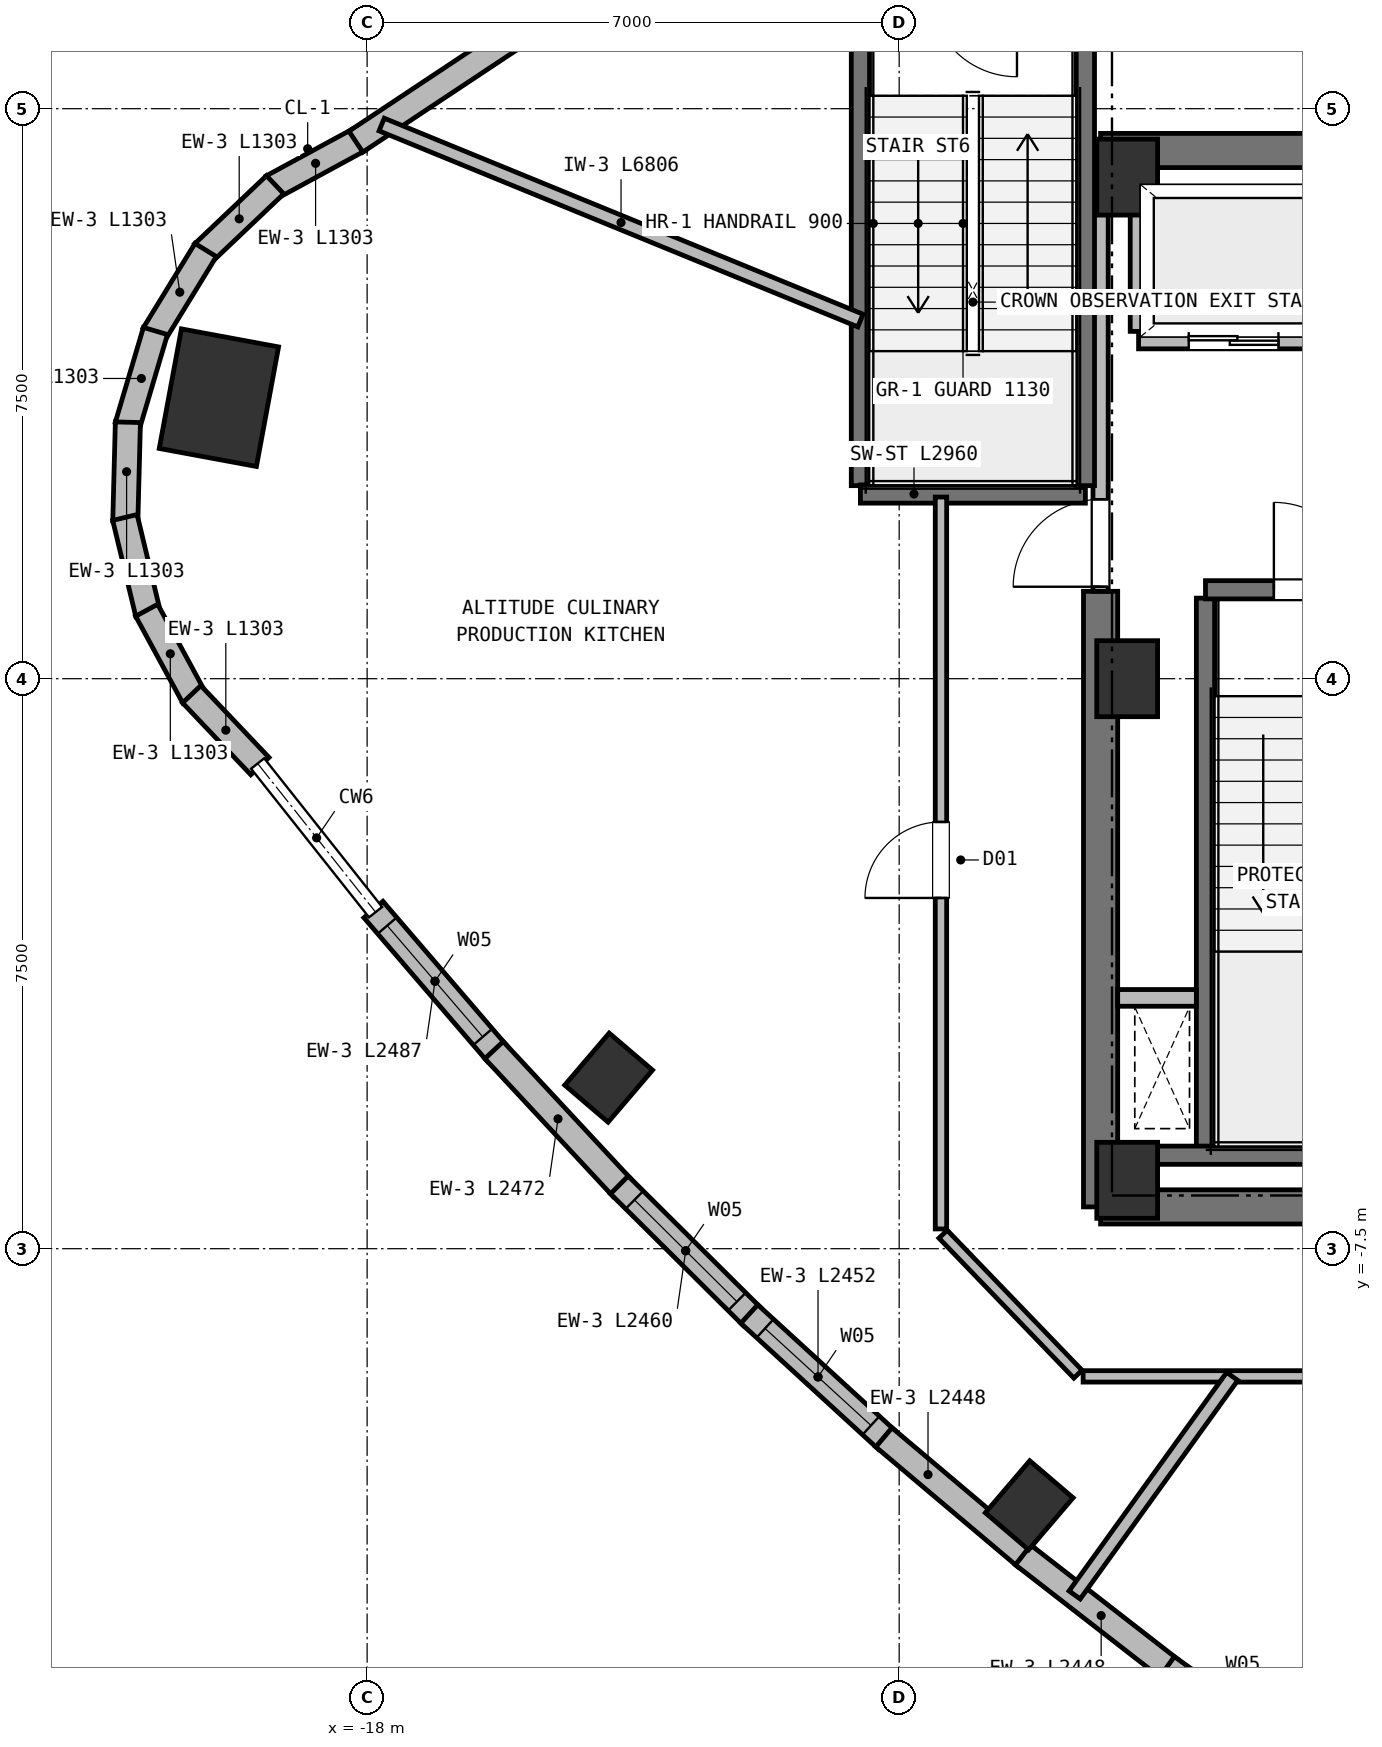
"""IFC4 building model, lengths in metres.
Left out: names, types, materials, properties, quantities, classifications, styles, units other than length and angle.
Written with IfcOpenShell. Run it as: python <this file> out.ifc"""

import sys

from ifc_helpers import new_model, si_unit, direction, frame, frame_2d, origin, origin_2d, place, context, subcontext, project, spatial, rectangle, extrude, element, fill, save


model = new_model("IFC4")
c1 = context("Model", 3, precision=1e-05, world=origin(), true_north=direction((0.0, 1.0)))
c2 = subcontext(c1, "Body", "Model", "MODEL_VIEW")
j1 = project(units=[si_unit("LENGTHUNIT", "METRE"), si_unit("PLANEANGLEUNIT", "RADIAN")], contexts=[c1])
p1 = place(None, origin())
s1 = spatial("IfcSite", under=j1, at=p1, CompositionType="ELEMENT")
p2 = place(p1, origin())
s2 = spatial("IfcBuilding", under=s1, at=p2, CompositionType="ELEMENT")
p3 = place(p2, frame((0.0, 0.0, 272.8)))
s3 = spatial("IfcBuildingStorey", under=s2, at=p3, CompositionType="ELEMENT", Elevation=272.8)
for number, where, z_axis, x_axis in (
    (1, (-8.0, -6.6, 0.0), (0.0, 0.0, 1.0), (1.0, 0.0, 0.0)),
    (2, (-8.0, 6.6, 0.0), (0.0, 0.0, 1.0), (1.0, 0.0, 0.0)),
    (3, (-8.0, 0.0, 0.0), (0.0, 0.0, 1.0), (1.0, 0.0, 0.0)),
):
    element("IfcColumn", number, at=place(p3, frame(where, z_axis=z_axis, x_axis=x_axis)), inside=s3, PredefinedType="COLUMN", context=c2, shape_type="SweptSolid", body=[
        extrude(rectangle(XDim=0.8, YDim=1.0, at=origin_2d()), origin(), (0.0, 0.0, 1.0), 4.4),
    ])
p4 = place(p3, frame((-8.35, 6.95, 0.0), z_axis=(0.0, 0.0, 1.0), x_axis=(1.0, 0.0, 0.0)))
e4 = element("IfcWall", 4, at=p4, inside=s3, PredefinedType="SHEAR", context=c2, shape_type="SweptSolid", body=[
    extrude(rectangle(XDim=16.7, YDim=0.45, at=frame_2d((8.35, 0.0))), origin(), (0.0, 0.0, 1.0), 4.15),
])
p5 = place(p3, frame((-8.35, -6.95, 0.0), z_axis=(0.0, 0.0, 1.0), x_axis=(1.0, 0.0, 0.0)))
e5 = element("IfcWall", 5, at=p5, inside=s3, PredefinedType="SHEAR", context=c2, shape_type="SweptSolid", body=[
    extrude(rectangle(XDim=3.95, YDim=0.45, at=frame_2d((1.975, 0.0))), origin(), (0.0, 0.0, 1.0), 4.15),
])
p6 = place(p3, frame((-8.35, -6.95, 0.0), z_axis=(0.0, 0.0, 1.0), x_axis=(0.0, 1.0, 0.0)))
e6 = element("IfcWall", 6, at=p6, inside=s3, PredefinedType="SHEAR", context=c2, shape_type="SweptSolid", body=[
    extrude(rectangle(XDim=8.1, YDim=0.45, at=frame_2d((4.05, 0.0))), origin(), (0.0, 0.0, 1.0), 4.15),
])
p7 = place(p3, frame((-19.95, 3.698, 0.0), z_axis=(0.0, 0.0, 1.0), x_axis=(-0.983254907564, 0.182235525492, 0.0)))
e7 = element("IfcColumn", 7, at=p7, inside=s3, PredefinedType="COLUMN", context=c2, shape_type="SweptSolid", body=[
    extrude(rectangle(XDim=1.3, YDim=1.6, at=origin_2d()), origin(), (0.0, 0.0, 1.0), 4.4),
])
for number, where, z_axis, x_axis in (
    (8, (-14.823, -5.249, 0.0), (0.0, 0.0, 1.0), (-0.76, 0.649, 0.0)),
    (9, (-9.289, -10.876, 0.0), (0.0, 0.0, 1.0), (-0.76, 0.649, 0.0)),
):
    element("IfcColumn", number, at=place(p3, frame(where, z_axis=z_axis, x_axis=x_axis)), inside=s3, PredefinedType="COLUMN", context=c2, shape_type="SweptSolid", body=[
        extrude(rectangle(XDim=0.75, YDim=0.9, at=origin_2d()), origin(), (0.0, 0.0, 1.0), 4.4),
    ])
p8 = place(p3, frame((-19.25, 6.47, 0.0), z_axis=(0.0, 0.0, 1.0), x_axis=(0.878774855812, 0.477236579478, 0.0)))
e10 = element("IfcWall", 10, at=p8, inside=s3, PredefinedType="SOLIDWALL", context=c2, shape_type="SweptSolid", body=[
    extrude(rectangle(XDim=1.303, YDim=0.33, at=frame_2d((0.651, 0.0))), origin(), (0.0, 0.0, 1.0), 4.15),
])
p9 = place(p3, frame((-20.156, 5.602, 0.0), z_axis=(0.0, 0.0, 1.0), x_axis=(0.725415712612, 0.688311008118, 0.0)))
e11 = element("IfcWall", 11, at=p9, inside=s3, PredefinedType="SOLIDWALL", context=c2, shape_type="SweptSolid", body=[
    extrude(rectangle(XDim=1.303, YDim=0.33, at=frame_2d((0.651, 0.0))), origin(), (0.0, 0.0, 1.0), 4.15),
])
p10 = place(p3, frame((-20.805, 4.53, 0.0), z_axis=(0.0, 0.0, 1.0), x_axis=(0.522601602676, 0.852577014047, 0.0)))
e12 = element("IfcWall", 12, at=p10, inside=s3, PredefinedType="SOLIDWALL", context=c2, shape_type="SweptSolid", body=[
    extrude(rectangle(XDim=1.303, YDim=0.33, at=frame_2d((0.651, 0.0))), origin(), (0.0, 0.0, 1.0), 4.15),
])
p11 = place(p3, frame((-21.155, 3.325, 0.0), z_axis=(0.0, 0.0, 1.0), x_axis=(0.284011785169, 0.958820789243, 0.0)))
e13 = element("IfcWall", 13, at=p11, inside=s3, PredefinedType="SOLIDWALL", context=c2, shape_type="SweptSolid", body=[
    extrude(rectangle(XDim=1.303, YDim=0.33, at=frame_2d((0.652, 0.0))), origin(), (0.0, 0.0, 1.0), 4.15),
])
for number, where, z_axis, x_axis in (
    (14, (-21.182, 2.072, 0.0), (0.0, 0.0, 1.0), (0.026, 1.0, 0.0)),
    (15, (-20.883, 0.854, 0.0), (0.0, 0.0, 1.0), (-0.233, 0.972, 0.0)),
    (16, (-20.279, -0.245, 0.0), (0.0, 0.0, 1.0), (-0.477, 0.879, 0.0)),
):
    element("IfcWall", number, at=place(p3, frame(where, z_axis=z_axis, x_axis=x_axis)), inside=s3, PredefinedType="SOLIDWALL", context=c2, shape_type="SweptSolid", body=[
        extrude(rectangle(XDim=1.303, YDim=0.33, at=frame_2d((0.651, 0.0))), origin(), (0.0, 0.0, 1.0), 4.15),
    ])
p12 = place(p3, frame((-19.411, -1.15, 0.0), z_axis=(0.0, 0.0, 1.0), x_axis=(-0.688316050819, 0.725410927809, 0.0)))
e17 = element("IfcWall", 17, at=p12, inside=s3, PredefinedType="SOLIDWALL", context=c2, shape_type="SweptSolid", body=[
    extrude(rectangle(XDim=1.303, YDim=0.33, at=frame_2d((0.652, 0.0))), origin(), (0.0, 0.0, 1.0), 4.15),
])
p13 = place(p3, frame((-16.297, -4.924, 0.0), z_axis=(0.0, 0.0, 1.0), x_axis=(-0.651591190477, 0.75857031348, 0.0)))
e18 = element("IfcWall", 18, at=p13, inside=s3, PredefinedType="SOLIDWALL", context=c2, shape_type="SweptSolid", body=[
    extrude(rectangle(XDim=2.488, YDim=0.33, at=frame_2d((1.244, 0.0))), origin(), (0.0, 0.0, 1.0), 4.15),
])
p14 = place(p13, frame((0.279, 0.0, 0.72)))
e19 = element("IfcOpeningElement", 19, at=p14, cuts=e18, PredefinedType="OPENING", context=c2, shape_type="SweptSolid", body=[
    extrude(rectangle(XDim=1.93, YDim=2.15, at=frame_2d((0.965, 1.075))), frame((0.0, 0.175, 0.0), z_axis=(0.0, -1.0, 0.0), x_axis=(1.0, 0.0, 0.0)), (0.0, 0.0, 1.0), 0.35),
])
p15 = place(p3, frame((-14.647, -6.697, 0.0), z_axis=(0.0, 0.0, 1.0), x_axis=(-0.681011582837, 0.732272643242, 0.0)))
e20 = element("IfcWall", 20, at=p15, inside=s3, PredefinedType="SOLIDWALL", context=c2, shape_type="SweptSolid", body=[
    extrude(rectangle(XDim=2.472, YDim=0.33, at=frame_2d((1.236, 0.0))), origin(), (0.0, 0.0, 1.0), 4.15),
])
p16 = place(p3, frame((-12.936, -8.394, 0.0), z_axis=(0.0, 0.0, 1.0), x_axis=(-0.709682736457, 0.704521407464, 0.0)))
e21 = element("IfcWall", 21, at=p16, inside=s3, PredefinedType="SOLIDWALL", context=c2, shape_type="SweptSolid", body=[
    extrude(rectangle(XDim=2.46, YDim=0.33, at=frame_2d((1.23, 0.0))), origin(), (0.0, 0.0, 1.0), 4.15),
])
p17 = place(p16, frame((0.28, 0.0, 0.72)))
e22 = element("IfcOpeningElement", 22, at=p17, cuts=e21, PredefinedType="OPENING", context=c2, shape_type="SweptSolid", body=[
    extrude(rectangle(XDim=1.9, YDim=2.15, at=frame_2d((0.95, 1.075))), frame((0.0, 0.175, 0.0), z_axis=(0.0, -1.0, 0.0), x_axis=(1.0, 0.0, 0.0)), (0.0, 0.0, 1.0), 0.35),
])
p18 = place(p3, frame((-11.164, -10.015, 0.0), z_axis=(0.0, 0.0, 1.0), x_axis=(-0.73744340021, 0.675408936487, 0.0)))
e23 = element("IfcWall", 23, at=p18, inside=s3, PredefinedType="SOLIDWALL", context=c2, shape_type="SweptSolid", body=[
    extrude(rectangle(XDim=2.452, YDim=0.33, at=frame_2d((1.226, 0.0))), origin(), (0.0, 0.0, 1.0), 4.15),
])
p19 = place(p18, frame((0.281, 0.0, 0.72)))
e24 = element("IfcOpeningElement", 24, at=p19, cuts=e23, PredefinedType="OPENING", context=c2, shape_type="SweptSolid", body=[
    extrude(rectangle(XDim=1.89, YDim=2.15, at=frame_2d((0.945, 1.075))), frame((0.0, 0.175, 0.0), z_axis=(0.0, -1.0, 0.0), x_axis=(1.0, 0.0, 0.0)), (0.0, 0.0, 1.0), 0.35),
])
p20 = place(p3, frame((-9.33, -11.561, 0.0), z_axis=(0.0, 0.0, 1.0), x_axis=(-0.764225429478, 0.644949217334, 0.0)))
e25 = element("IfcWall", 25, at=p20, inside=s3, PredefinedType="SOLIDWALL", context=c2, shape_type="SweptSolid", body=[
    extrude(rectangle(XDim=2.448, YDim=0.33, at=frame_2d((1.224, 0.0))), origin(), (0.0, 0.0, 1.0), 4.15),
])
p21 = place(p3, frame((-7.435, -13.031, 0.0), z_axis=(0.0, 0.0, 1.0), x_axis=(-0.789786954421, 0.613381257152, 0.0)))
e26 = element("IfcWall", 26, at=p21, inside=s3, PredefinedType="SOLIDWALL", context=c2, shape_type="SweptSolid", body=[
    extrude(rectangle(XDim=2.448, YDim=0.33, at=frame_2d((1.224, 0.0))), origin(), (0.0, 0.0, 1.0), 4.15),
])
p22 = place(p3, frame((-5.48, -14.427, 0.0), z_axis=(0.0, 0.0, 1.0), x_axis=(-0.813854547638, 0.581068649378, 0.0)))
e27 = element("IfcWall", 27, at=p22, inside=s3, PredefinedType="SOLIDWALL", context=c2, shape_type="SweptSolid", body=[
    extrude(rectangle(XDim=2.452, YDim=0.33, at=frame_2d((1.226, 0.0))), origin(), (0.0, 0.0, 1.0), 4.15),
])
p23 = place(p22, frame((0.281, 0.0, 0.72)))
e28 = element("IfcOpeningElement", 28, at=p23, cuts=e27, PredefinedType="OPENING", context=c2, shape_type="SweptSolid", body=[
    extrude(rectangle(XDim=1.89, YDim=2.15, at=frame_2d((0.945, 1.075))), frame((0.0, 0.175, 0.0), z_axis=(0.0, -1.0, 0.0), x_axis=(1.0, 0.0, 0.0)), (0.0, 0.0, 1.0), 0.35),
])
p24 = place(p3, frame((-18.148, 7.066, 0.0), z_axis=(0.0, 0.0, 1.0), x_axis=(0.833157490591, 0.55303579981, 0.0)))
e29 = element("IfcWall", 29, at=p24, inside=s3, PredefinedType="SOLIDWALL", context=c2, shape_type="SweptSolid", body=[
    extrude(rectangle(XDim=2.507, YDim=0.33, at=frame_2d((1.253, 0.0))), origin(), (0.0, 0.0, 1.0), 4.15),
])
p25 = place(p3, frame((-6.97, -6.16, 0.0), z_axis=(0.0, 0.0, 1.0), x_axis=(0.0, 1.0, 0.0)))
e30 = element("IfcWall", 30, at=p25, inside=s3, PredefinedType="SHEAR", context=c2, shape_type="SweptSolid", body=[
    extrude(rectangle(XDim=7.22, YDim=0.24, at=frame_2d((3.61, 0.0))), origin(), (0.0, 0.0, 1.0), 4.15),
])
p26 = place(p3, frame((-7.6, -6.27, 0.0), z_axis=(0.0, 0.0, 1.0), x_axis=(1.0, 0.0, 0.0)))
e31 = element("IfcWall", 31, at=p26, inside=s3, PredefinedType="SHEAR", context=c2, shape_type="SweptSolid", body=[
    extrude(rectangle(XDim=3.59, YDim=0.24, at=frame_2d((1.795, 0.0))), origin(), (0.0, 0.0, 1.0), 4.15),
])
p27 = place(p3, frame((-6.97, 1.17, 0.0), z_axis=(0.0, 0.0, 1.0), x_axis=(1.0, 0.0, 0.0)))
e32 = element("IfcWall", 32, at=p27, inside=s3, PredefinedType="SHEAR", context=c2, shape_type="SweptSolid", body=[
    extrude(rectangle(XDim=2.96, YDim=0.24, at=frame_2d((1.48, 0.0))), origin(), (0.0, 0.0, 1.0), 4.15),
])
p28 = place(p27, frame((0.9, 0.0, 0.0)))
e33 = element("IfcOpeningElement", 33, at=p28, cuts=e32, PredefinedType="OPENING", context=c2, shape_type="SweptSolid", body=[
    extrude(rectangle(XDim=1.15, YDim=2.15, at=frame_2d((0.575, 1.075))), frame((0.0, 0.13, 0.0), z_axis=(0.0, -1.0, 0.0), x_axis=(1.0, 0.0, 0.0)), (0.0, 0.0, 1.0), 0.26),
])
p29 = place(p3, frame((-8.125, -4.2, 0.0), z_axis=(0.0, 0.0, 1.0), x_axis=(1.0, 0.0, 0.0)))
e34 = element("IfcWall", 34, at=p29, inside=s3, PredefinedType="PARTITIONING", context=c2, shape_type="SweptSolid", body=[
    extrude(rectangle(XDim=1.035, YDim=0.22, at=frame_2d((0.518, 0.0))), origin(), (0.0, 0.0, 1.0), 4.15),
])
p30 = place(p3, frame((-7.85, 4.45, 0.0), z_axis=(0.0, 0.0, 1.0), x_axis=(1.0, 0.0, 0.0)))
e35 = element("IfcWall", 35, at=p30, inside=s3, PredefinedType="PARTITIONING", context=c2, shape_type="SweptSolid", body=[
    extrude(rectangle(XDim=2.5, YDim=0.22, at=frame_2d((1.25, 0.0))), origin(), (0.0, 0.0, 1.0), 4.15),
])
p31 = place(p30, frame((0.66, 0.0, 0.0)))
e36 = element("IfcOpeningElement", 36, at=p31, cuts=e35, PredefinedType="OPENING", context=c2, shape_type="SweptSolid", body=[
    extrude(rectangle(XDim=1.18, YDim=2.15, at=frame_2d((0.59, 1.075))), frame((0.0, 0.12, 0.0), z_axis=(0.0, -1.0, 0.0), x_axis=(1.0, 0.0, 0.0)), (0.0, 0.0, 1.0), 0.24),
])
p32 = place(p3, frame((-7.85, 4.57, 0.0), z_axis=(0.0, 0.0, 1.0), x_axis=(0.0, 1.0, 0.0)))
e37 = element("IfcWall", 37, at=p32, inside=s3, PredefinedType="PARTITIONING", context=c2, shape_type="SweptSolid", body=[
    extrude(rectangle(XDim=2.155, YDim=0.22, at=frame_2d((1.078, 0.0))), origin(), (0.0, 0.0, 1.0), 3.83),
])
p33 = place(p3, frame((-8.35, 1.15, 0.0), z_axis=(0.0, 0.0, 1.0), x_axis=(0.0, 1.0, 0.0)))
e38 = element("IfcWall", 38, at=p33, inside=s3, PredefinedType="PARTITIONING", context=c2, shape_type="SweptSolid", body=[
    extrude(rectangle(XDim=5.4, YDim=0.2, at=frame_2d((2.7, 0.0))), origin(), (0.0, 0.0, 1.0), 4.15),
])
p34 = place(p33, frame((0.06, 0.0, 0.0)))
e39 = element("IfcOpeningElement", 39, at=p34, cuts=e38, PredefinedType="OPENING", context=c2, shape_type="SweptSolid", body=[
    extrude(rectangle(XDim=1.15, YDim=2.15, at=frame_2d((0.575, 1.075))), frame((0.0, 0.11, 0.0), z_axis=(0.0, -1.0, 0.0), x_axis=(1.0, 0.0, 0.0)), (0.0, 0.0, 1.0), 0.22),
])
p35 = place(p3, frame((-11.51, 2.54, 0.0), z_axis=(0.0, 0.0, 1.0), x_axis=(0.0, 1.0, 0.0)))
e40 = element("IfcWall", 40, at=p35, inside=s3, PredefinedType="SHEAR", context=c2, shape_type="SweptSolid", body=[
    extrude(rectangle(XDim=6.42, YDim=0.24, at=frame_2d((3.21, 0.0))), origin(), (0.0, 0.0, 1.0), 4.15),
])
p36 = place(p3, frame((-11.51, 2.43, 0.0), z_axis=(0.0, 0.0, 1.0), x_axis=(1.0, 0.0, 0.0)))
e41 = element("IfcWall", 41, at=p36, inside=s3, PredefinedType="SHEAR", context=c2, shape_type="SweptSolid", body=[
    extrude(rectangle(XDim=2.96, YDim=0.24, at=frame_2d((1.48, 0.0))), origin(), (0.0, 0.0, 1.0), 4.15),
])
p37 = place(p3, frame((-8.55, 2.54, 0.0), z_axis=(0.0, 0.0, 1.0), x_axis=(0.0, 1.0, 0.0)))
e42 = element("IfcWall", 42, at=p37, inside=s3, PredefinedType="SHEAR", context=c2, shape_type="SweptSolid", body=[
    extrude(rectangle(XDim=6.42, YDim=0.24, at=frame_2d((3.21, 0.0))), origin(), (0.0, 0.0, 1.0), 4.15),
])
p38 = place(p3, frame((8.58, -9.18, 0.0), z_axis=(0.0, 0.0, 1.0), x_axis=(-1.0, 0.0, 0.0)))
e43 = element("IfcWall", 43, at=p38, inside=s3, PredefinedType="PARTITIONING", context=c2, shape_type="SweptSolid", body=[
    extrude(rectangle(XDim=17.16, YDim=0.15, at=frame_2d((8.58, 0.0))), origin(), (0.0, 0.0, 1.0), 3.86),
])
p39 = place(p38, frame((9.364, 0.0, 0.0)))
e44 = element("IfcOpeningElement", 44, at=p39, cuts=e43, PredefinedType="OPENING", context=c2, shape_type="SweptSolid", body=[
    extrude(rectangle(XDim=1.0, YDim=2.15, at=frame_2d((0.5, 1.075))), frame((0.0, 0.085, 0.0), z_axis=(0.0, -1.0, 0.0), x_axis=(1.0, 0.0, 0.0)), (0.0, 0.0, 1.0), 0.17),
])
p40 = place(p3, frame((-10.45, -7.24, 0.0), z_axis=(0.0, 0.0, 1.0), x_axis=(0.0, 1.0, 0.0)))
e45 = element("IfcWall", 45, at=p40, inside=s3, PredefinedType="PARTITIONING", context=c2, shape_type="SweptSolid", body=[
    extrude(rectangle(XDim=9.63, YDim=0.15, at=frame_2d((4.815, 0.0))), origin(), (0.0, 0.0, 1.0), 4.15),
])
p41 = place(p40, frame((4.355, 0.0, 0.0)))
e46 = element("IfcOpeningElement", 46, at=p41, cuts=e45, PredefinedType="OPENING", context=c2, shape_type="SweptSolid", body=[
    extrude(rectangle(XDim=1.0, YDim=2.15, at=frame_2d((0.5, 1.075))), frame((0.0, 0.085, 0.0), z_axis=(0.0, -1.0, 0.0), x_axis=(1.0, 0.0, 0.0)), (0.0, 0.0, 1.0), 0.17),
])
p42 = place(p3, frame((-8.648, -9.151, 0.0), z_axis=(0.0, 0.0, 1.0), x_axis=(-0.693764562202, 0.720201869085, 0.0)))
e47 = element("IfcWall", 47, at=p42, inside=s3, PredefinedType="PARTITIONING", context=c2, shape_type="SweptSolid", body=[
    extrude(rectangle(XDim=2.558, YDim=0.15, at=frame_2d((1.279, 0.0))), origin(), (0.0, 0.0, 1.0), 4.15),
])
p43 = place(p3, frame((-11.51, 4.712, 0.0), z_axis=(0.0, 0.0, 1.0), x_axis=(-0.925422915291, 0.378935915234, 0.0)))
e48 = element("IfcWall", 48, at=p43, inside=s3, PredefinedType="PARTITIONING", context=c2, shape_type="SweptSolid", body=[
    extrude(rectangle(XDim=6.806, YDim=0.18, at=frame_2d((3.403, 0.0))), origin(), (0.0, 0.0, 1.0), 4.15),
])
p44 = place(p3, frame((-6.618, -9.18, 0.0), z_axis=(0.0, 0.0, 1.0), x_axis=(-0.584788931395, -0.811185494026, 0.0)))
e49 = element("IfcWall", 49, at=p44, inside=s3, PredefinedType="PARTITIONING", context=c2, shape_type="SweptSolid", body=[
    extrude(rectangle(XDim=3.546, YDim=0.18, at=frame_2d((1.773, 0.0))), origin(), (0.0, 0.0, 1.0), 4.15),
])
p45 = place(p14, origin())
e50 = element("IfcWindow", 50, at=p45, inside=s3, PartitioningType="SINGLE_PANEL", PredefinedType="WINDOW", context=c2, shape_type="SweptSolid", body=[
    extrude(rectangle(XDim=1.93, YDim=2.15, at=frame_2d((0.965, 1.075))), frame((0.0, 0.03, 0.0), z_axis=(0.0, -1.0, 0.0), x_axis=(1.0, 0.0, 0.0)), (0.0, 0.0, 1.0), 0.06),
])
fill(e19, e50)
p46 = place(p17, origin())
e51 = element("IfcWindow", 51, at=p46, inside=s3, PartitioningType="SINGLE_PANEL", PredefinedType="WINDOW", context=c2, shape_type="SweptSolid", body=[
    extrude(rectangle(XDim=1.9, YDim=2.15, at=frame_2d((0.95, 1.075))), frame((0.0, 0.03, 0.0), z_axis=(0.0, -1.0, 0.0), x_axis=(1.0, 0.0, 0.0)), (0.0, 0.0, 1.0), 0.06),
])
fill(e22, e51)
p47 = place(p19, origin())
e52 = element("IfcWindow", 52, at=p47, inside=s3, PartitioningType="SINGLE_PANEL", PredefinedType="WINDOW", context=c2, shape_type="SweptSolid", body=[
    extrude(rectangle(XDim=1.89, YDim=2.15, at=frame_2d((0.945, 1.075))), frame((0.0, 0.03, 0.0), z_axis=(0.0, -1.0, 0.0), x_axis=(1.0, 0.0, 0.0)), (0.0, 0.0, 1.0), 0.06),
])
fill(e24, e52)
p48 = place(p28, origin())
e53 = element("IfcDoor", 53, at=p48, inside=s3, OperationType="SINGLE_SWING_LEFT", PredefinedType="DOOR", context=c2, shape_type="SweptSolid", body=[
    extrude(rectangle(XDim=1.15, YDim=2.15, at=frame_2d((0.575, 1.075))), frame((0.0, 0.025, 0.0), z_axis=(0.0, -1.0, 0.0), x_axis=(1.0, 0.0, 0.0)), (0.0, 0.0, 1.0), 0.05),
])
fill(e33, e53)
p49 = place(p31, origin())
e54 = element("IfcDoor", 54, at=p49, inside=s3, OperationType="DOUBLE_DOOR_SLIDING", PredefinedType="DOOR", context=c2, shape_type="SweptSolid", body=[
    extrude(rectangle(XDim=1.18, YDim=2.15, at=frame_2d((0.59, 1.075))), frame((0.0, 0.025, 0.0), z_axis=(0.0, -1.0, 0.0), x_axis=(1.0, 0.0, 0.0)), (0.0, 0.0, 1.0), 0.05),
])
fill(e36, e54)
p50 = place(p34, origin())
e55 = element("IfcDoor", 55, at=p50, inside=s3, OperationType="SINGLE_SWING_LEFT", PredefinedType="DOOR", context=c2, shape_type="SweptSolid", body=[
    extrude(rectangle(XDim=1.15, YDim=2.15, at=frame_2d((0.575, 1.075))), frame((0.0, 0.025, 0.0), z_axis=(0.0, -1.0, 0.0), x_axis=(1.0, 0.0, 0.0)), (0.0, 0.0, 1.0), 0.05),
])
fill(e39, e55)
p51 = place(p41, origin())
e56 = element("IfcDoor", 56, at=p51, inside=s3, OperationType="SINGLE_SWING_LEFT", PredefinedType="DOOR", context=c2, shape_type="SweptSolid", body=[
    extrude(rectangle(XDim=1.0, YDim=2.15, at=frame_2d((0.5, 1.075))), frame((0.0, 0.025, 0.0), z_axis=(0.0, -1.0, 0.0), x_axis=(1.0, 0.0, 0.0)), (0.0, 0.0, 1.0), 0.05),
])
fill(e46, e56)
save(model, sys.argv[1])
